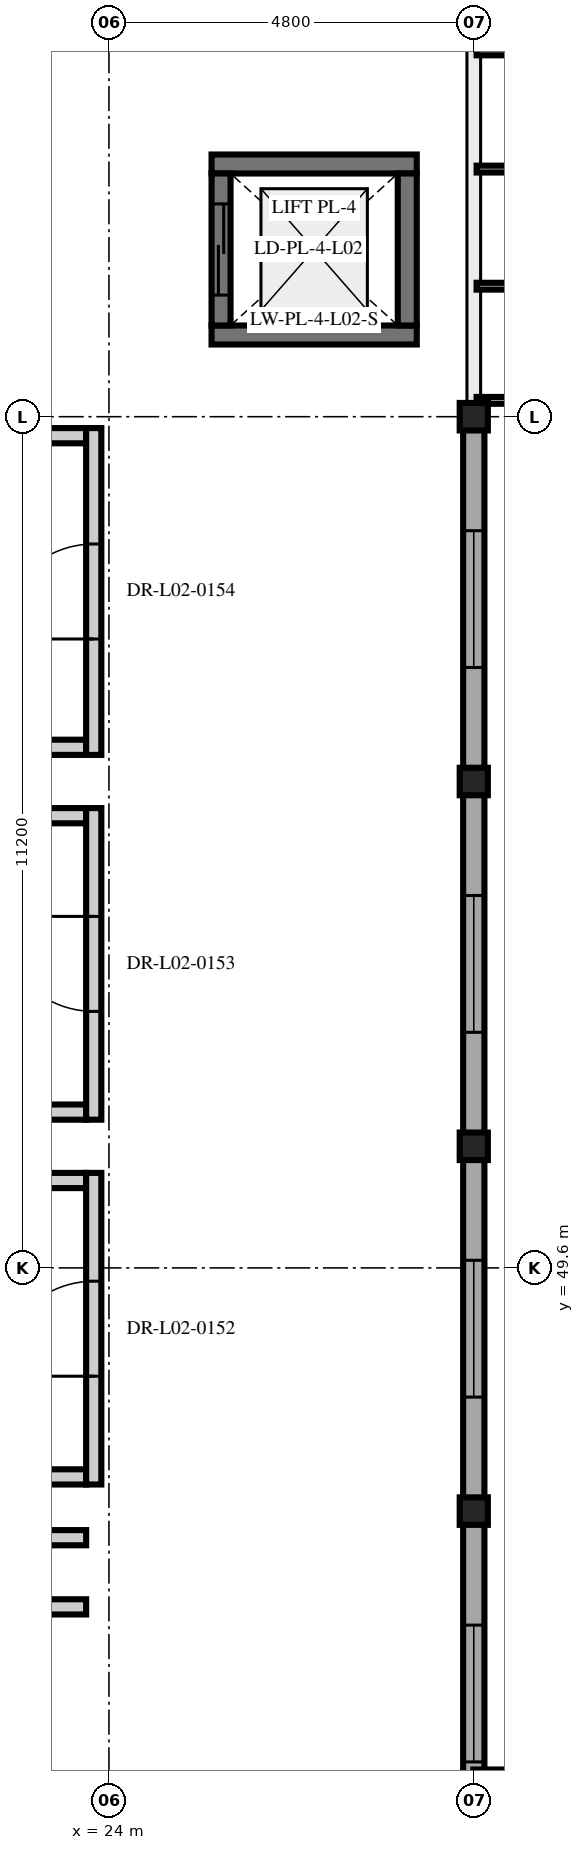
"""IFC4 building model, lengths in metres.
Left out: names, types, materials, properties, quantities, classifications, styles, units other than length and angle.
Written with IfcOpenShell. Run it as: python <this file> out.ifc"""

import sys

from ifc_helpers import new_model, si_unit, direction, frame, frame_2d, origin, origin_2d, place, context, subcontext, project, spatial, rectangle, i_section, extrude, element, fill, save


model = new_model("IFC4")
c1 = context("Model", 3, precision=1e-05, world=origin(), true_north=direction((0.0, 1.0)))
c2 = subcontext(c1, "Body", "Model", "MODEL_VIEW")
j1 = project(units=[si_unit("LENGTHUNIT", "METRE"), si_unit("PLANEANGLEUNIT", "RADIAN")], contexts=[c1])
p1 = place(None, origin())
s1 = spatial("IfcSite", under=j1, at=p1, CompositionType="ELEMENT")
p2 = place(p1, origin())
s2 = spatial("IfcBuilding", under=s1, at=p2, CompositionType="ELEMENT")
p3 = place(p2, frame((0.0, 0.0, 9.6)))
s3 = spatial("IfcBuildingStorey", under=s2, at=p3, CompositionType="ELEMENT", Elevation=9.6)
for number, where, z_axis, x_axis in (
    (1, (28.8, 46.4, 0.0), (0.0, 0.0, 1.0), (1.0, 0.0, 0.0)),
    (2, (28.8, 51.2, 0.0), (0.0, 0.0, 1.0), (1.0, 0.0, 0.0)),
    (3, (28.8, 56.0, 0.0), (0.0, 0.0, 1.0), (1.0, 0.0, 0.0)),
    (4, (28.8, 60.8, 0.0), (0.0, 0.0, 1.0), (1.0, 0.0, 0.0)),
):
    element("IfcColumn", number, at=place(p3, frame(where, z_axis=z_axis, x_axis=x_axis)), inside=s3, PredefinedType="COLUMN", context=c2, shape_type="SweptSolid", body=[
        extrude(i_section(OverallWidth=0.371, OverallDepth=0.362, WebThickness=0.012, FlangeThickness=0.021, at=origin_2d()), origin(), (0.0, 0.0, 1.0), 4.5),
    ])
for number, where, z_axis, x_axis in (
    (5, (28.05, 61.875, 0.0), (0.0, 0.0, 1.0), (-1.0, 0.0, 0.0)),
    (6, (25.35, 64.125, 0.0), (0.0, 0.0, 1.0), (1.0, 0.0, 0.0)),
):
    element("IfcWall", number, at=place(p3, frame(where, z_axis=z_axis, x_axis=x_axis)), inside=s3, PredefinedType="SHEAR", context=c2, shape_type="SweptSolid", body=[
        extrude(rectangle(XDim=2.7, YDim=0.25, at=frame_2d((1.35, 0.0))), origin(), (0.0, 0.0, 1.0), 4.26),
    ])
p4 = place(p3, frame((25.475, 62.0, 0.0), z_axis=(0.0, 0.0, 1.0), x_axis=(0.0, 1.0, 0.0)))
e7 = element("IfcWall", 7, at=p4, inside=s3, PredefinedType="SHEAR", context=c2, shape_type="SweptSolid", body=[
    extrude(rectangle(XDim=2.0, YDim=0.25, at=frame_2d((1.0, 0.0))), origin(), (0.0, 0.0, 1.0), 4.26),
])
p5 = place(p4, frame((0.4, 0.0, 0.0)))
e8 = element("IfcOpeningElement", 8, at=p5, cuts=e7, PredefinedType="OPENING", context=c2, shape_type="SweptSolid", body=[
    extrude(rectangle(XDim=1.2, YDim=2.2, at=frame_2d((0.6, 1.1))), frame((0.0, 0.135, 0.0), z_axis=(0.0, -1.0, 0.0), x_axis=(1.0, 0.0, 0.0)), (0.0, 0.0, 1.0), 0.27),
])
p6 = place(p3, frame((27.925, 64.0, 0.0), z_axis=(0.0, 0.0, 1.0), x_axis=(0.0, -1.0, 0.0)))
e9 = element("IfcWall", 9, at=p6, inside=s3, PredefinedType="SHEAR", context=c2, shape_type="SweptSolid", body=[
    extrude(rectangle(XDim=2.0, YDim=0.25, at=frame_2d((1.0, 0.0))), origin(), (0.0, 0.0, 1.0), 4.26),
])
p7 = place(p3, frame((28.8, 46.485, 0.0), z_axis=(0.0, 0.0, 1.0), x_axis=(0.0, -1.0, 0.0)))
e10 = element("IfcWall", 10, at=p7, inside=s3, PredefinedType="SOLIDWALL", context=c2, shape_type="SweptSolid", body=[
    extrude(rectangle(XDim=4.97, YDim=0.28, at=frame_2d((2.485, 0.0))), origin(), (0.0, 0.0, 1.0), 3.635),
])
p8 = place(p7, frame((1.585, 0.0, 1.0)))
e11 = element("IfcOpeningElement", 11, at=p8, cuts=e10, PredefinedType="OPENING", context=c2, shape_type="SweptSolid", body=[
    extrude(rectangle(XDim=1.8, YDim=2.1, at=frame_2d((0.9, 1.05))), frame((0.0, 0.15, 0.0), z_axis=(0.0, -1.0, 0.0), x_axis=(1.0, 0.0, 0.0)), (0.0, 0.0, 1.0), 0.3),
])
p9 = place(p3, frame((28.8, 51.285, 0.0), z_axis=(0.0, 0.0, 1.0), x_axis=(0.0, -1.0, 0.0)))
e12 = element("IfcWall", 12, at=p9, inside=s3, PredefinedType="SOLIDWALL", context=c2, shape_type="SweptSolid", body=[
    extrude(rectangle(XDim=4.97, YDim=0.28, at=frame_2d((2.485, 0.0))), origin(), (0.0, 0.0, 1.0), 3.635),
])
p10 = place(p9, frame((1.585, 0.0, 1.0)))
e13 = element("IfcOpeningElement", 13, at=p10, cuts=e12, PredefinedType="OPENING", context=c2, shape_type="SweptSolid", body=[
    extrude(rectangle(XDim=1.8, YDim=2.1, at=frame_2d((0.9, 1.05))), frame((0.0, 0.15, 0.0), z_axis=(0.0, -1.0, 0.0), x_axis=(1.0, 0.0, 0.0)), (0.0, 0.0, 1.0), 0.3),
])
p11 = place(p3, frame((28.8, 56.085, 0.0), z_axis=(0.0, 0.0, 1.0), x_axis=(0.0, -1.0, 0.0)))
e14 = element("IfcWall", 14, at=p11, inside=s3, PredefinedType="SOLIDWALL", context=c2, shape_type="SweptSolid", body=[
    extrude(rectangle(XDim=4.97, YDim=0.28, at=frame_2d((2.485, 0.0))), origin(), (0.0, 0.0, 1.0), 3.635),
])
p12 = place(p11, frame((1.585, 0.0, 1.0)))
e15 = element("IfcOpeningElement", 15, at=p12, cuts=e14, PredefinedType="OPENING", context=c2, shape_type="SweptSolid", body=[
    extrude(rectangle(XDim=1.8, YDim=2.1, at=frame_2d((0.9, 1.05))), frame((0.0, 0.15, 0.0), z_axis=(0.0, -1.0, 0.0), x_axis=(1.0, 0.0, 0.0)), (0.0, 0.0, 1.0), 0.3),
])
p13 = place(p3, frame((28.8, 60.885, 0.0), z_axis=(0.0, 0.0, 1.0), x_axis=(0.0, -1.0, 0.0)))
e16 = element("IfcWall", 16, at=p13, inside=s3, PredefinedType="SOLIDWALL", context=c2, shape_type="SweptSolid", body=[
    extrude(rectangle(XDim=4.97, YDim=0.28, at=frame_2d((2.485, 0.0))), origin(), (0.0, 0.0, 1.0), 3.635),
])
p14 = place(p13, frame((1.585, 0.0, 1.0)))
e17 = element("IfcOpeningElement", 17, at=p14, cuts=e16, PredefinedType="OPENING", context=c2, shape_type="SweptSolid", body=[
    extrude(rectangle(XDim=1.8, YDim=2.1, at=frame_2d((0.9, 1.05))), frame((0.0, 0.15, 0.0), z_axis=(0.0, -1.0, 0.0), x_axis=(1.0, 0.0, 0.0)), (0.0, 0.0, 1.0), 0.3),
])
p15 = place(p3, frame((0.04, 45.14, 0.0), z_axis=(0.0, 0.0, 1.0), x_axis=(1.0, 0.0, 0.0)))
e18 = element("IfcWall", 18, at=p15, inside=s3, PredefinedType="PARTITIONING", context=c2, shape_type="SweptSolid", body=[
    extrude(rectangle(XDim=23.66, YDim=0.2, at=frame_2d((11.83, 0.0))), origin(), (0.0, 0.0, 1.0), 3.702),
])
p16 = place(p15, frame((11.355, 0.0, 0.0)))
e19 = element("IfcOpeningElement", 19, at=p16, cuts=e18, PredefinedType="OPENING", context=c2, shape_type="SweptSolid", body=[
    extrude(rectangle(XDim=0.95, YDim=2.1, at=frame_2d((0.475, 1.05))), frame((0.0, 0.11, 0.0), z_axis=(0.0, -1.0, 0.0), x_axis=(1.0, 0.0, 0.0)), (0.0, 0.0, 1.0), 0.22),
])
for number, where, z_axis, x_axis in (
    (20, (0.04, 46.05, 0.0), (0.0, 0.0, 1.0), (1.0, 0.0, 0.0)),
    (21, (0.04, 46.85, 0.0), (0.0, 0.0, 1.0), (1.0, 0.0, 0.0)),
    (22, (0.04, 50.75, 0.0), (0.0, 0.0, 1.0), (1.0, 0.0, 0.0)),
):
    element("IfcWall", number, at=place(p3, frame(where, z_axis=z_axis, x_axis=x_axis)), inside=s3, PredefinedType="PARTITIONING", context=c2, shape_type="SweptSolid", body=[
        extrude(rectangle(XDim=23.66, YDim=0.2, at=frame_2d((11.83, 0.0))), origin(), (0.0, 0.0, 1.0), 3.702),
    ])
p17 = place(p3, frame((23.8, 46.75, 0.0), z_axis=(0.0, 0.0, 1.0), x_axis=(0.0, 1.0, 0.0)))
e23 = element("IfcWall", 23, at=p17, inside=s3, PredefinedType="PARTITIONING", context=c2, shape_type="SweptSolid", body=[
    extrude(rectangle(XDim=4.1, YDim=0.2, at=frame_2d((2.05, 0.0))), origin(), (0.0, 0.0, 1.0), 4.26),
])
p18 = place(p17, frame((1.425, 0.0, 0.0)))
e24 = element("IfcOpeningElement", 24, at=p18, cuts=e23, PredefinedType="OPENING", context=c2, shape_type="SweptSolid", body=[
    extrude(rectangle(XDim=1.25, YDim=2.25, at=frame_2d((0.625, 1.125))), frame((0.0, 0.11, 0.0), z_axis=(0.0, -1.0, 0.0), x_axis=(1.0, 0.0, 0.0)), (0.0, 0.0, 1.0), 0.22),
])
for number, where, z_axis, x_axis in (
    (25, (0.04, 51.65, 0.0), (0.0, 0.0, 1.0), (1.0, 0.0, 0.0)),
    (26, (0.04, 55.55, 0.0), (0.0, 0.0, 1.0), (1.0, 0.0, 0.0)),
):
    element("IfcWall", number, at=place(p3, frame(where, z_axis=z_axis, x_axis=x_axis)), inside=s3, PredefinedType="PARTITIONING", context=c2, shape_type="SweptSolid", body=[
        extrude(rectangle(XDim=23.66, YDim=0.2, at=frame_2d((11.83, 0.0))), origin(), (0.0, 0.0, 1.0), 3.702),
    ])
p19 = place(p3, frame((23.8, 51.55, 0.0), z_axis=(0.0, 0.0, 1.0), x_axis=(0.0, 1.0, 0.0)))
e27 = element("IfcWall", 27, at=p19, inside=s3, PredefinedType="PARTITIONING", context=c2, shape_type="SweptSolid", body=[
    extrude(rectangle(XDim=4.1, YDim=0.2, at=frame_2d((2.05, 0.0))), origin(), (0.0, 0.0, 1.0), 4.26),
])
p20 = place(p19, frame((1.425, 0.0, 0.0)))
e28 = element("IfcOpeningElement", 28, at=p20, cuts=e27, PredefinedType="OPENING", context=c2, shape_type="SweptSolid", body=[
    extrude(rectangle(XDim=1.25, YDim=2.25, at=frame_2d((0.625, 1.125))), frame((0.0, 0.11, 0.0), z_axis=(0.0, -1.0, 0.0), x_axis=(1.0, 0.0, 0.0)), (0.0, 0.0, 1.0), 0.22),
])
for number, where, z_axis, x_axis in (
    (29, (0.04, 56.45, 0.0), (0.0, 0.0, 1.0), (1.0, 0.0, 0.0)),
    (30, (0.04, 60.55, 0.0), (0.0, 0.0, 1.0), (1.0, 0.0, 0.0)),
):
    element("IfcWall", number, at=place(p3, frame(where, z_axis=z_axis, x_axis=x_axis)), inside=s3, PredefinedType="PARTITIONING", context=c2, shape_type="SweptSolid", body=[
        extrude(rectangle(XDim=23.66, YDim=0.2, at=frame_2d((11.83, 0.0))), origin(), (0.0, 0.0, 1.0), 3.702),
    ])
p21 = place(p3, frame((23.8, 56.35, 0.0), z_axis=(0.0, 0.0, 1.0), x_axis=(0.0, 1.0, 0.0)))
e31 = element("IfcWall", 31, at=p21, inside=s3, PredefinedType="PARTITIONING", context=c2, shape_type="SweptSolid", body=[
    extrude(rectangle(XDim=4.3, YDim=0.2, at=frame_2d((2.15, 0.0))), origin(), (0.0, 0.0, 1.0), 3.735),
])
p22 = place(p21, frame((1.525, 0.0, 0.0)))
e32 = element("IfcOpeningElement", 32, at=p22, cuts=e31, PredefinedType="OPENING", context=c2, shape_type="SweptSolid", body=[
    extrude(rectangle(XDim=1.25, YDim=2.25, at=frame_2d((0.625, 1.125))), frame((0.0, 0.11, 0.0), z_axis=(0.0, -1.0, 0.0), x_axis=(1.0, 0.0, 0.0)), (0.0, 0.0, 1.0), 0.22),
])
p23 = place(p5, origin())
e33 = element("IfcDoor", 33, at=p23, inside=s3, OperationType="DOUBLE_DOOR_SLIDING", PredefinedType="DOOR", context=c2, shape_type="SweptSolid", body=[
    extrude(rectangle(XDim=1.2, YDim=2.2, at=frame_2d((0.6, 1.1))), frame((0.0, 0.025, 0.0), z_axis=(0.0, -1.0, 0.0), x_axis=(1.0, 0.0, 0.0)), (0.0, 0.0, 1.0), 0.05),
])
fill(e8, e33)
p24 = place(p8, origin())
e34 = element("IfcWindow", 34, at=p24, inside=s3, PartitioningType="SINGLE_PANEL", PredefinedType="WINDOW", context=c2, shape_type="SweptSolid", body=[
    extrude(rectangle(XDim=1.8, YDim=2.1, at=frame_2d((0.9, 1.05))), frame((0.0, 0.03, 0.0), z_axis=(0.0, -1.0, 0.0), x_axis=(1.0, 0.0, 0.0)), (0.0, 0.0, 1.0), 0.06),
])
fill(e11, e34)
p25 = place(p10, origin())
e35 = element("IfcWindow", 35, at=p25, inside=s3, PartitioningType="SINGLE_PANEL", PredefinedType="WINDOW", context=c2, shape_type="SweptSolid", body=[
    extrude(rectangle(XDim=1.8, YDim=2.1, at=frame_2d((0.9, 1.05))), frame((0.0, 0.03, 0.0), z_axis=(0.0, -1.0, 0.0), x_axis=(1.0, 0.0, 0.0)), (0.0, 0.0, 1.0), 0.06),
])
fill(e13, e35)
p26 = place(p12, origin())
e36 = element("IfcWindow", 36, at=p26, inside=s3, PartitioningType="SINGLE_PANEL", PredefinedType="WINDOW", context=c2, shape_type="SweptSolid", body=[
    extrude(rectangle(XDim=1.8, YDim=2.1, at=frame_2d((0.9, 1.05))), frame((0.0, 0.03, 0.0), z_axis=(0.0, -1.0, 0.0), x_axis=(1.0, 0.0, 0.0)), (0.0, 0.0, 1.0), 0.06),
])
fill(e15, e36)
p27 = place(p14, origin())
e37 = element("IfcWindow", 37, at=p27, inside=s3, PartitioningType="SINGLE_PANEL", PredefinedType="WINDOW", context=c2, shape_type="SweptSolid", body=[
    extrude(rectangle(XDim=1.8, YDim=2.1, at=frame_2d((0.9, 1.05))), frame((0.0, 0.03, 0.0), z_axis=(0.0, -1.0, 0.0), x_axis=(1.0, 0.0, 0.0)), (0.0, 0.0, 1.0), 0.06),
])
fill(e17, e37)
p28 = place(p18, origin())
e38 = element("IfcDoor", 38, at=p28, inside=s3, OperationType="SINGLE_SWING_LEFT", PredefinedType="DOOR", context=c2, shape_type="SweptSolid", body=[
    extrude(rectangle(XDim=1.25, YDim=2.25, at=frame_2d((0.625, 1.125))), frame((0.0, 0.025, 0.0), z_axis=(0.0, -1.0, 0.0), x_axis=(1.0, 0.0, 0.0)), (0.0, 0.0, 1.0), 0.05),
])
fill(e24, e38)
p29 = place(p20, origin())
e39 = element("IfcDoor", 39, at=p29, inside=s3, OperationType="SINGLE_SWING_RIGHT", PredefinedType="DOOR", context=c2, shape_type="SweptSolid", body=[
    extrude(rectangle(XDim=1.25, YDim=2.25, at=frame_2d((0.625, 1.125))), frame((0.0, 0.025, 0.0), z_axis=(0.0, -1.0, 0.0), x_axis=(1.0, 0.0, 0.0)), (0.0, 0.0, 1.0), 0.05),
])
fill(e28, e39)
p30 = place(p22, origin())
e40 = element("IfcDoor", 40, at=p30, inside=s3, OperationType="SINGLE_SWING_LEFT", PredefinedType="DOOR", context=c2, shape_type="SweptSolid", body=[
    extrude(rectangle(XDim=1.25, YDim=2.25, at=frame_2d((0.625, 1.125))), frame((0.0, 0.025, 0.0), z_axis=(0.0, -1.0, 0.0), x_axis=(1.0, 0.0, 0.0)), (0.0, 0.0, 1.0), 0.05),
])
fill(e32, e40)
save(model, sys.argv[1])
